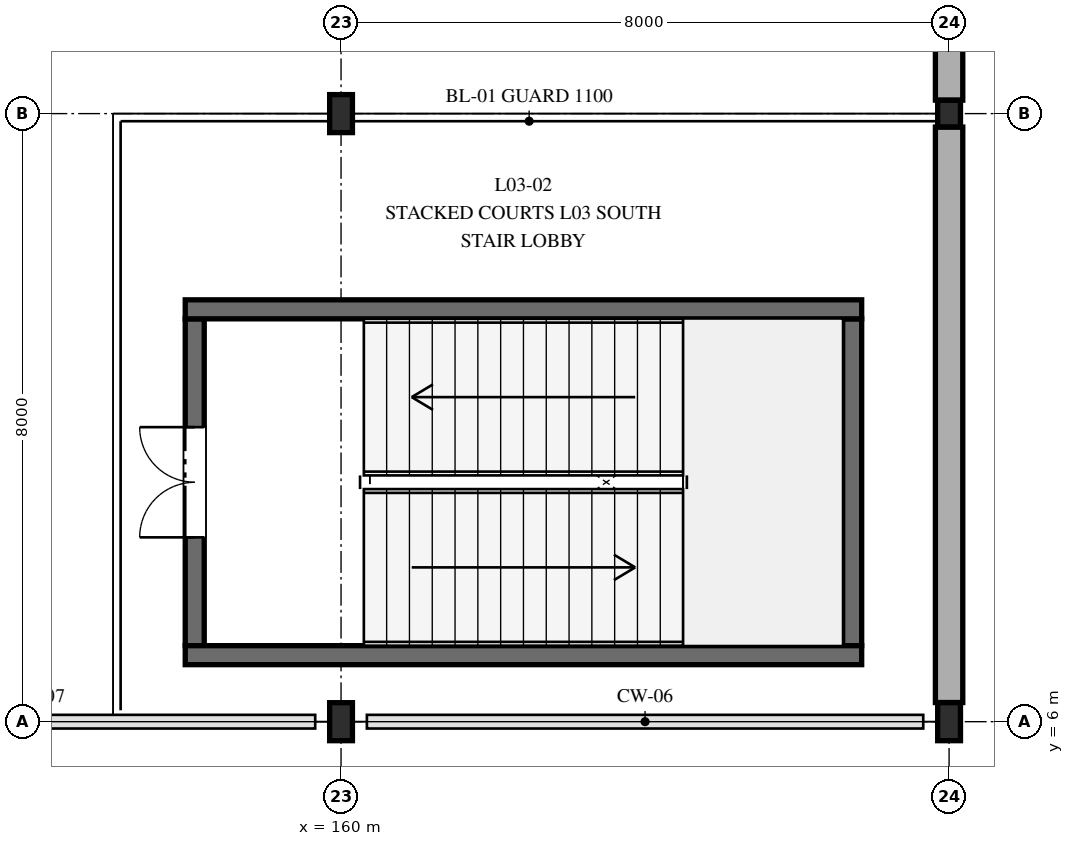
"""IFC4 building model, lengths in metres.
Left out: names, types, materials, properties, quantities, classifications, styles, units other than length and angle.
Written with IfcOpenShell. Run it as: python <this file> out.ifc"""

import sys

from ifc_helpers import new_model, si_unit, direction, frame, frame_2d, origin, origin_2d, place, context, subcontext, project, spatial, rectangle, i_section, extrude, element, fill, save


model = new_model("IFC4")
c1 = context("Model", 3, precision=1e-05, world=origin(), true_north=direction((0.0, 1.0)))
c2 = subcontext(c1, "Body", "Model", "MODEL_VIEW")
j1 = project(units=[si_unit("LENGTHUNIT", "METRE"), si_unit("PLANEANGLEUNIT", "RADIAN")], contexts=[c1])
p1 = place(None, origin())
s1 = spatial("IfcSite", under=j1, at=p1, CompositionType="ELEMENT")
p2 = place(p1, origin())
s2 = spatial("IfcBuilding", under=s1, at=p2, CompositionType="ELEMENT")
p3 = place(p2, frame((0.0, 0.0, 14.0)))
s3 = spatial("IfcBuildingStorey", under=s2, at=p3, CompositionType="ELEMENT", Elevation=14.0)
for number, where, z_axis, x_axis in (
    (1, (160.0, 6.0, 0.0), (0.0, 0.0, 1.0), (1.0, 0.0, 0.0)),
    (2, (168.0, 6.0, 0.0), (0.0, 0.0, 1.0), (1.0, 0.0, 0.0)),
    (3, (160.0, 14.0, 0.0), (0.0, 0.0, 1.0), (1.0, 0.0, 0.0)),
):
    element("IfcColumn", number, at=place(p3, frame(where, z_axis=z_axis, x_axis=x_axis)), inside=s3, PredefinedType="COLUMN", context=c2, shape_type="SweptSolid", body=[
        extrude(i_section(OverallWidth=0.3, OverallDepth=0.5, WebThickness=0.014, FlangeThickness=0.028, FilletRadius=0.027, at=origin_2d()), origin(), (0.0, 0.0, 1.0), 4.11),
    ])
p4 = place(p3, frame((168.0, 14.0, 0.0), z_axis=(0.0, 0.0, 1.0), x_axis=(1.0, 0.0, 0.0)))
e4 = element("IfcColumn", 4, at=p4, inside=s3, PredefinedType="COLUMN", context=c2, shape_type="SweptSolid", body=[
    extrude(i_section(OverallWidth=0.3, OverallDepth=0.35, WebThickness=0.01, FlangeThickness=0.018, FilletRadius=0.027, at=origin_2d()), origin(), (0.0, 0.0, 1.0), 4.6),
])
p5 = place(p3, frame((168.0, 6.252, 0.0), z_axis=(0.0, 0.0, 1.0), x_axis=(0.0, 1.0, 0.0)))
e5 = element("IfcWall", 5, at=p5, inside=s3, PredefinedType="STANDARD", context=c2, shape_type="SweptSolid", body=[
    extrude(rectangle(XDim=7.571, YDim=0.36, at=frame_2d((3.786, 0.0))), origin(), (0.0, 0.0, 1.0), 4.3),
])
p6 = place(p3, frame((168.0, 14.177, 0.0), z_axis=(0.0, 0.0, 1.0), x_axis=(0.0, 1.0, 0.0)))
e6 = element("IfcWall", 6, at=p6, inside=s3, PredefinedType="STANDARD", context=c2, shape_type="SweptSolid", body=[
    extrude(rectangle(XDim=7.646, YDim=0.36, at=frame_2d((3.823, 0.0))), origin(), (0.0, 0.0, 1.0), 4.3),
])
p7 = place(p3, frame((158.075, 7.0, 0.0), z_axis=(0.0, 0.0, 1.0), x_axis=(0.0, 1.0, 0.0)))
e7 = element("IfcWall", 7, at=p7, inside=s3, PredefinedType="SHEAR", context=c2, shape_type="SweptSolid", body=[
    extrude(rectangle(XDim=4.3, YDim=0.25, at=frame_2d((2.15, 0.0))), origin(), (0.0, 0.0, 1.0), 4.6),
])
p8 = place(p7, frame((1.425, 0.0, 0.0)))
e8 = element("IfcOpeningElement", 8, at=p8, cuts=e7, PredefinedType="OPENING", context=c2, shape_type="SweptSolid", body=[
    extrude(rectangle(XDim=1.45, YDim=2.2, at=frame_2d((0.725, 1.1))), frame((0.0, 0.135, 0.0), z_axis=(0.0, -1.0, 0.0), x_axis=(1.0, 0.0, 0.0)), (0.0, 0.0, 1.0), 0.27),
])
p9 = place(p3, frame((166.725, 11.3, 0.0), z_axis=(0.0, 0.0, 1.0), x_axis=(0.0, -1.0, 0.0)))
e9 = element("IfcWall", 9, at=p9, inside=s3, PredefinedType="SHEAR", context=c2, shape_type="SweptSolid", body=[
    extrude(rectangle(XDim=4.3, YDim=0.25, at=frame_2d((2.15, 0.0))), origin(), (0.0, 0.0, 1.0), 4.6),
])
for number, where, z_axis, x_axis in (
    (10, (157.95, 6.875, 0.0), (0.0, 0.0, 1.0), (1.0, 0.0, 0.0)),
    (11, (166.85, 11.425, 0.0), (0.0, 0.0, 1.0), (-1.0, 0.0, 0.0)),
):
    element("IfcWall", number, at=place(p3, frame(where, z_axis=z_axis, x_axis=x_axis)), inside=s3, PredefinedType="SHEAR", context=c2, shape_type="SweptSolid", body=[
        extrude(rectangle(XDim=8.9, YDim=0.25, at=frame_2d((4.45, 0.0))), origin(), (0.0, 0.0, 1.0), 4.6),
    ])
p10 = place(p8, origin())
e12 = element("IfcDoor", 12, at=p10, inside=s3, OperationType="DOUBLE_DOOR_SINGLE_SWING", PredefinedType="DOOR", context=c2, shape_type="SweptSolid", body=[
    extrude(rectangle(XDim=1.45, YDim=2.2, at=frame_2d((0.725, 1.1))), frame((0.0, 0.025, 0.0), z_axis=(0.0, -1.0, 0.0), x_axis=(1.0, 0.0, 0.0)), (0.0, 0.0, 1.0), 0.05),
])
fill(e8, e12)
save(model, sys.argv[1])
